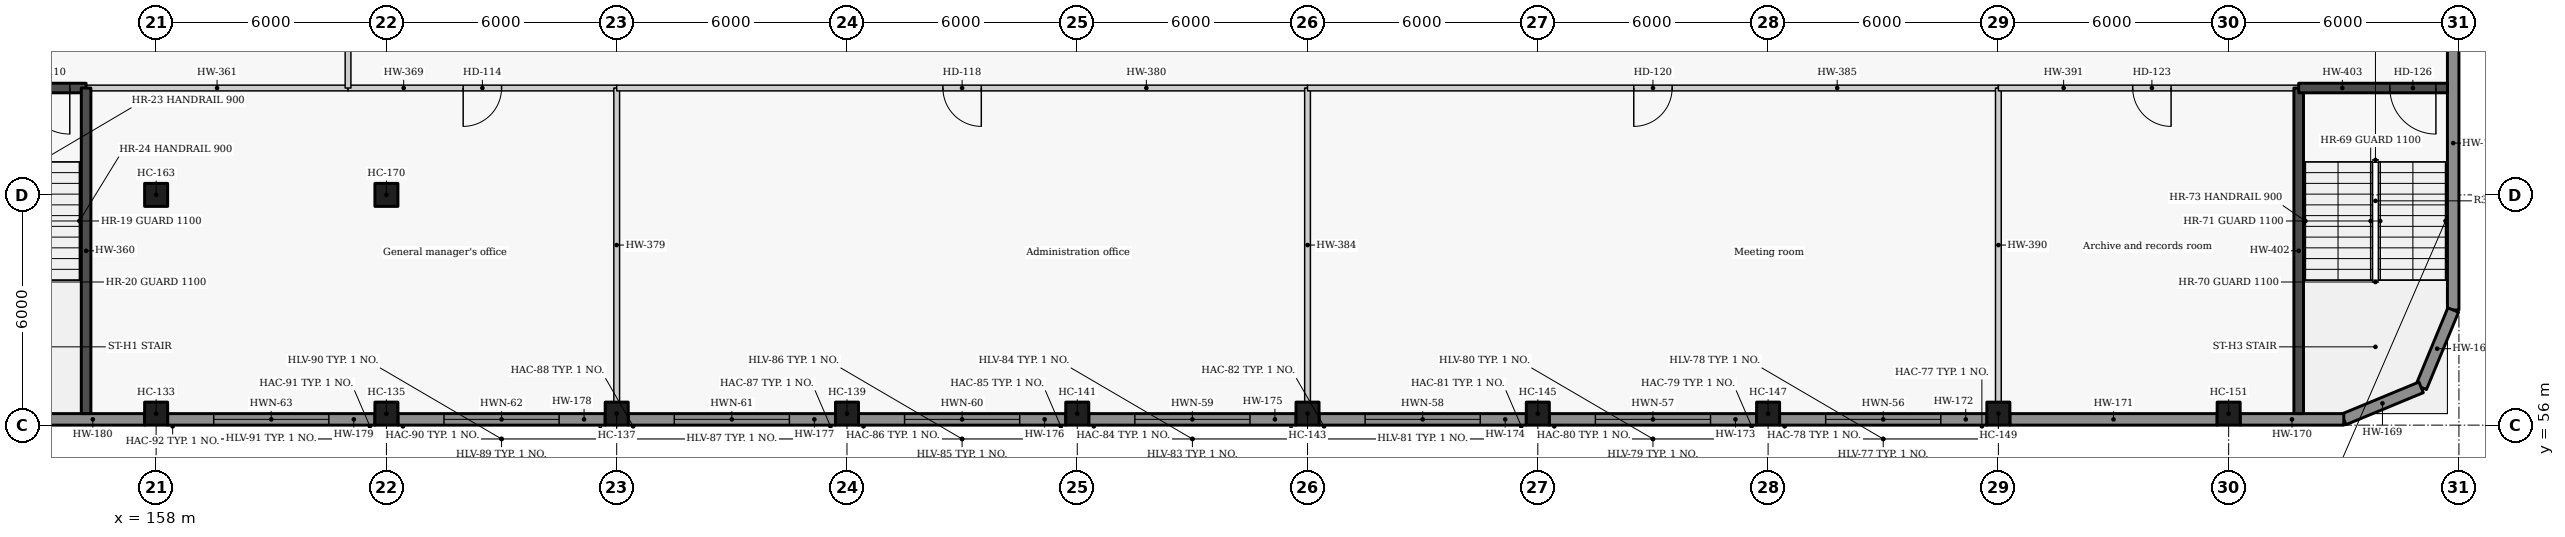
"""IFC4 building model, lengths in metres.
Left out: names, types, materials, properties, quantities, classifications, styles, units other than length and angle.
Written with IfcOpenShell. Run it as: python <this file> out.ifc"""

import sys

from ifc_helpers import new_model, si_unit, direction, frame, frame_2d, origin, origin_2d, place, context, subcontext, project, spatial, rectangle, extrude, element, fill, save


model = new_model("IFC4")
c1 = context("Model", 3, precision=1e-05, world=origin(), true_north=direction((0.0, 1.0)))
c2 = subcontext(c1, "Body", "Model", "MODEL_VIEW")
j1 = project(units=[si_unit("LENGTHUNIT", "METRE"), si_unit("PLANEANGLEUNIT", "RADIAN")], contexts=[c1])
p1 = place(None, origin())
s1 = spatial("IfcSite", under=j1, at=p1, CompositionType="ELEMENT")
p2 = place(p1, origin())
s2 = spatial("IfcBuilding", under=s1, at=p2, CompositionType="ELEMENT")
p3 = place(p2, frame((0.0, 0.0, 15.6)))
s3 = spatial("IfcBuildingStorey", under=s2, at=p3, CompositionType="ELEMENT", Elevation=15.6)
for number, where, z_axis, x_axis in (
    (1, (158.0, 56.3, 0.0), (0.0, 0.0, 1.0), (1.0, 0.0, 0.0)),
    (2, (164.0, 56.3, 0.0), (0.0, 0.0, 1.0), (1.0, 0.0, 0.0)),
    (3, (170.0, 56.3, 0.0), (0.0, 0.0, 1.0), (1.0, 0.0, 0.0)),
    (4, (176.0, 56.3, 0.0), (0.0, 0.0, 1.0), (1.0, 0.0, 0.0)),
    (5, (182.0, 56.3, 0.0), (0.0, 0.0, 1.0), (1.0, 0.0, 0.0)),
    (6, (188.0, 56.3, 0.0), (0.0, 0.0, 1.0), (1.0, 0.0, 0.0)),
    (7, (194.0, 56.3, 0.0), (0.0, 0.0, 1.0), (1.0, 0.0, 0.0)),
    (8, (200.0, 56.3, 0.0), (0.0, 0.0, 1.0), (1.0, 0.0, 0.0)),
    (9, (206.0, 56.3, 0.0), (0.0, 0.0, 1.0), (1.0, 0.0, 0.0)),
    (10, (212.0, 56.3, 0.0), (0.0, 0.0, 1.0), (1.0, 0.0, 0.0)),
    (11, (158.0, 62.0, 0.0), (0.0, 0.0, 1.0), (1.0, 0.0, 0.0)),
    (12, (164.0, 62.0, 0.0), (0.0, 0.0, 1.0), (1.0, 0.0, 0.0)),
):
    element("IfcColumn", number, at=place(p3, frame(where, z_axis=z_axis, x_axis=x_axis)), inside=s3, PredefinedType="COLUMN", context=c2, shape_type="SweptSolid", body=[
        extrude(rectangle(XDim=0.6, YDim=0.6, at=origin_2d()), origin(), (0.0, 0.0, 1.0), 4.2),
    ])
p4 = place(p3, frame((217.85, 67.7, 0.0), z_axis=(0.0, 0.0, 1.0), x_axis=(0.0, -1.0, 0.0)))
e13 = element("IfcWall", 13, at=p4, inside=s3, PredefinedType="SOLIDWALL", context=c2, shape_type="SweptSolid", body=[
    extrude(rectangle(XDim=8.7, YDim=0.3, at=frame_2d((4.35, 0.0))), origin(), (0.0, 0.0, 1.0), 4.2),
])
for number, where, z_axis, x_axis in (
    (14, (217.85, 59.0, 0.0), (0.0, 0.0, 1.0), (-0.383, -0.924, 0.0)),
    (15, (217.015, 56.985, 0.0), (0.0, 0.0, 1.0), (-0.924, -0.383, 0.0)),
):
    element("IfcWall", number, at=place(p3, frame(where, z_axis=z_axis, x_axis=x_axis)), inside=s3, PredefinedType="SOLIDWALL", context=c2, shape_type="SweptSolid", body=[
        extrude(rectangle(XDim=2.181, YDim=0.3, at=frame_2d((1.091, 0.0))), origin(), (0.0, 0.0, 1.0), 4.2),
    ])
p5 = place(p3, frame((215.0, 56.15, 0.0), z_axis=(0.0, 0.0, 1.0), x_axis=(-1.0, 0.0, 0.0)))
e16 = element("IfcWall", 16, at=p5, inside=s3, PredefinedType="SOLIDWALL", context=c2, shape_type="SweptSolid", body=[
    extrude(rectangle(XDim=2.7, YDim=0.3, at=frame_2d((1.35, 0.0))), origin(), (0.0, 0.0, 1.0), 4.2),
])
p6 = place(p3, frame((211.7, 56.15, 0.0), z_axis=(0.0, 0.0, 1.0), x_axis=(-1.0, 0.0, 0.0)))
e17 = element("IfcWall", 17, at=p6, inside=s3, PredefinedType="SOLIDWALL", context=c2, shape_type="SweptSolid", body=[
    extrude(rectangle(XDim=5.4, YDim=0.3, at=frame_2d((2.7, 0.0))), origin(), (0.0, 0.0, 1.0), 4.2),
])
p7 = place(p3, frame((205.7, 56.15, 0.0), z_axis=(0.0, 0.0, 1.0), x_axis=(-1.0, 0.0, 0.0)))
e18 = element("IfcWall", 18, at=p7, inside=s3, PredefinedType="SOLIDWALL", context=c2, shape_type="SweptSolid", body=[
    extrude(rectangle(XDim=5.4, YDim=0.3, at=frame_2d((2.7, 0.0))), origin(), (0.0, 0.0, 1.0), 4.2),
])
p8 = place(p7, frame((1.2, 0.0, 0.9)))
e19 = element("IfcOpeningElement", 19, at=p8, cuts=e18, PredefinedType="OPENING", context=c2, shape_type="SweptSolid", body=[
    extrude(rectangle(XDim=3.0, YDim=1.8, at=frame_2d((1.5, 0.9))), frame((0.0, 0.16, 0.0), z_axis=(0.0, -1.0, 0.0), x_axis=(1.0, 0.0, 0.0)), (0.0, 0.0, 1.0), 0.32),
])
p9 = place(p3, frame((199.7, 56.15, 0.0), z_axis=(0.0, 0.0, 1.0), x_axis=(-1.0, 0.0, 0.0)))
e20 = element("IfcWall", 20, at=p9, inside=s3, PredefinedType="SOLIDWALL", context=c2, shape_type="SweptSolid", body=[
    extrude(rectangle(XDim=5.4, YDim=0.3, at=frame_2d((2.7, 0.0))), origin(), (0.0, 0.0, 1.0), 4.2),
])
p10 = place(p9, frame((1.2, 0.0, 0.9)))
e21 = element("IfcOpeningElement", 21, at=p10, cuts=e20, PredefinedType="OPENING", context=c2, shape_type="SweptSolid", body=[
    extrude(rectangle(XDim=3.0, YDim=1.8, at=frame_2d((1.5, 0.9))), frame((0.0, 0.16, 0.0), z_axis=(0.0, -1.0, 0.0), x_axis=(1.0, 0.0, 0.0)), (0.0, 0.0, 1.0), 0.32),
])
p11 = place(p3, frame((193.7, 56.15, 0.0), z_axis=(0.0, 0.0, 1.0), x_axis=(-1.0, 0.0, 0.0)))
e22 = element("IfcWall", 22, at=p11, inside=s3, PredefinedType="SOLIDWALL", context=c2, shape_type="SweptSolid", body=[
    extrude(rectangle(XDim=5.4, YDim=0.3, at=frame_2d((2.7, 0.0))), origin(), (0.0, 0.0, 1.0), 4.2),
])
p12 = place(p11, frame((1.2, 0.0, 0.9)))
e23 = element("IfcOpeningElement", 23, at=p12, cuts=e22, PredefinedType="OPENING", context=c2, shape_type="SweptSolid", body=[
    extrude(rectangle(XDim=3.0, YDim=1.8, at=frame_2d((1.5, 0.9))), frame((0.0, 0.16, 0.0), z_axis=(0.0, -1.0, 0.0), x_axis=(1.0, 0.0, 0.0)), (0.0, 0.0, 1.0), 0.32),
])
p13 = place(p3, frame((187.7, 56.15, 0.0), z_axis=(0.0, 0.0, 1.0), x_axis=(-1.0, 0.0, 0.0)))
e24 = element("IfcWall", 24, at=p13, inside=s3, PredefinedType="SOLIDWALL", context=c2, shape_type="SweptSolid", body=[
    extrude(rectangle(XDim=5.4, YDim=0.3, at=frame_2d((2.7, 0.0))), origin(), (0.0, 0.0, 1.0), 4.2),
])
p14 = place(p13, frame((1.2, 0.0, 0.9)))
e25 = element("IfcOpeningElement", 25, at=p14, cuts=e24, PredefinedType="OPENING", context=c2, shape_type="SweptSolid", body=[
    extrude(rectangle(XDim=3.0, YDim=1.8, at=frame_2d((1.5, 0.9))), frame((0.0, 0.16, 0.0), z_axis=(0.0, -1.0, 0.0), x_axis=(1.0, 0.0, 0.0)), (0.0, 0.0, 1.0), 0.32),
])
p15 = place(p3, frame((181.7, 56.15, 0.0), z_axis=(0.0, 0.0, 1.0), x_axis=(-1.0, 0.0, 0.0)))
e26 = element("IfcWall", 26, at=p15, inside=s3, PredefinedType="SOLIDWALL", context=c2, shape_type="SweptSolid", body=[
    extrude(rectangle(XDim=5.4, YDim=0.3, at=frame_2d((2.7, 0.0))), origin(), (0.0, 0.0, 1.0), 4.2),
])
p16 = place(p15, frame((1.2, 0.0, 0.9)))
e27 = element("IfcOpeningElement", 27, at=p16, cuts=e26, PredefinedType="OPENING", context=c2, shape_type="SweptSolid", body=[
    extrude(rectangle(XDim=3.0, YDim=1.8, at=frame_2d((1.5, 0.9))), frame((0.0, 0.16, 0.0), z_axis=(0.0, -1.0, 0.0), x_axis=(1.0, 0.0, 0.0)), (0.0, 0.0, 1.0), 0.32),
])
p17 = place(p3, frame((175.7, 56.15, 0.0), z_axis=(0.0, 0.0, 1.0), x_axis=(-1.0, 0.0, 0.0)))
e28 = element("IfcWall", 28, at=p17, inside=s3, PredefinedType="SOLIDWALL", context=c2, shape_type="SweptSolid", body=[
    extrude(rectangle(XDim=5.4, YDim=0.3, at=frame_2d((2.7, 0.0))), origin(), (0.0, 0.0, 1.0), 4.2),
])
p18 = place(p17, frame((1.2, 0.0, 0.9)))
e29 = element("IfcOpeningElement", 29, at=p18, cuts=e28, PredefinedType="OPENING", context=c2, shape_type="SweptSolid", body=[
    extrude(rectangle(XDim=3.0, YDim=1.8, at=frame_2d((1.5, 0.9))), frame((0.0, 0.16, 0.0), z_axis=(0.0, -1.0, 0.0), x_axis=(1.0, 0.0, 0.0)), (0.0, 0.0, 1.0), 0.32),
])
p19 = place(p3, frame((169.7, 56.15, 0.0), z_axis=(0.0, 0.0, 1.0), x_axis=(-1.0, 0.0, 0.0)))
e30 = element("IfcWall", 30, at=p19, inside=s3, PredefinedType="SOLIDWALL", context=c2, shape_type="SweptSolid", body=[
    extrude(rectangle(XDim=5.4, YDim=0.3, at=frame_2d((2.7, 0.0))), origin(), (0.0, 0.0, 1.0), 4.2),
])
p20 = place(p19, frame((1.2, 0.0, 0.9)))
e31 = element("IfcOpeningElement", 31, at=p20, cuts=e30, PredefinedType="OPENING", context=c2, shape_type="SweptSolid", body=[
    extrude(rectangle(XDim=3.0, YDim=1.8, at=frame_2d((1.5, 0.9))), frame((0.0, 0.16, 0.0), z_axis=(0.0, -1.0, 0.0), x_axis=(1.0, 0.0, 0.0)), (0.0, 0.0, 1.0), 0.32),
])
p21 = place(p3, frame((163.7, 56.15, 0.0), z_axis=(0.0, 0.0, 1.0), x_axis=(-1.0, 0.0, 0.0)))
e32 = element("IfcWall", 32, at=p21, inside=s3, PredefinedType="SOLIDWALL", context=c2, shape_type="SweptSolid", body=[
    extrude(rectangle(XDim=5.4, YDim=0.3, at=frame_2d((2.7, 0.0))), origin(), (0.0, 0.0, 1.0), 4.2),
])
p22 = place(p21, frame((1.2, 0.0, 0.9)))
e33 = element("IfcOpeningElement", 33, at=p22, cuts=e32, PredefinedType="OPENING", context=c2, shape_type="SweptSolid", body=[
    extrude(rectangle(XDim=3.0, YDim=1.8, at=frame_2d((1.5, 0.9))), frame((0.0, 0.16, 0.0), z_axis=(0.0, -1.0, 0.0), x_axis=(1.0, 0.0, 0.0)), (0.0, 0.0, 1.0), 0.32),
])
p23 = place(p3, frame((157.7, 56.15, 0.0), z_axis=(0.0, 0.0, 1.0), x_axis=(-1.0, 0.0, 0.0)))
e34 = element("IfcWall", 34, at=p23, inside=s3, PredefinedType="SOLIDWALL", context=c2, shape_type="SweptSolid", body=[
    extrude(rectangle(XDim=2.7, YDim=0.3, at=frame_2d((1.35, 0.0))), origin(), (0.0, 0.0, 1.0), 4.2),
])
p24 = place(p3, frame((156.175, 64.785, 0.0), z_axis=(0.0, 0.0, 1.0), x_axis=(-1.0, 0.0, 0.0)))
e35 = element("IfcWall", 35, at=p24, inside=s3, PredefinedType="SOLIDWALL", context=c2, shape_type="SweptSolid", body=[
    extrude(rectangle(XDim=3.875, YDim=0.25, at=frame_2d((1.938, 0.0))), origin(), (0.0, 0.0, 1.0), 4.2),
])
p25 = place(p24, frame((0.425, 0.0, 0.0)))
e36 = element("IfcOpeningElement", 36, at=p25, cuts=e35, PredefinedType="OPENING", context=c2, shape_type="SweptSolid", body=[
    extrude(rectangle(XDim=1.2, YDim=2.1, at=frame_2d((0.6, 1.05))), frame((0.0, 0.135, 0.0), z_axis=(0.0, -1.0, 0.0), x_axis=(1.0, 0.0, 0.0)), (0.0, 0.0, 1.0), 0.27),
])
p26 = place(p3, frame((156.175, 64.785, 0.0), z_axis=(0.0, 0.0, 1.0), x_axis=(0.0, -1.0, 0.0)))
e37 = element("IfcWall", 37, at=p26, inside=s3, PredefinedType="SOLIDWALL", context=c2, shape_type="SweptSolid", body=[
    extrude(rectangle(XDim=8.485, YDim=0.25, at=frame_2d((4.242, 0.0))), origin(), (0.0, 0.0, 1.0), 4.2),
])
p27 = place(p3, frame((163.0, 64.785, 0.0), z_axis=(0.0, 0.0, 1.0), x_axis=(-1.0, 0.0, 0.0)))
e38 = element("IfcWall", 38, at=p27, inside=s3, PredefinedType="PARTITIONING", context=c2, shape_type="SweptSolid", body=[
    extrude(rectangle(XDim=6.825, YDim=0.15, at=frame_2d((3.413, 0.0))), origin(), (0.0, 0.0, 1.0), 3.85),
])
p28 = place(p3, frame((170.0, 64.785, 0.0), z_axis=(0.0, 0.0, 1.0), x_axis=(-1.0, 0.0, 0.0)))
e39 = element("IfcWall", 39, at=p28, inside=s3, PredefinedType="PARTITIONING", context=c2, shape_type="SweptSolid", body=[
    extrude(rectangle(XDim=7.0, YDim=0.15, at=frame_2d((3.5, 0.0))), origin(), (0.0, 0.0, 1.0), 3.85),
])
p29 = place(p28, frame((3.0, 0.0, 0.0)))
e40 = element("IfcOpeningElement", 40, at=p29, cuts=e39, PredefinedType="OPENING", context=c2, shape_type="SweptSolid", body=[
    extrude(rectangle(XDim=1.0, YDim=2.1, at=frame_2d((0.5, 1.05))), frame((0.0, 0.085, 0.0), z_axis=(0.0, -1.0, 0.0), x_axis=(1.0, 0.0, 0.0)), (0.0, 0.0, 1.0), 0.17),
])
p30 = place(p3, frame((163.0, 64.785, 0.0), z_axis=(0.0, 0.0, 1.0), x_axis=(0.0, 1.0, 0.0)))
e41 = element("IfcWall", 41, at=p30, inside=s3, PredefinedType="PARTITIONING", context=c2, shape_type="SweptSolid", body=[
    extrude(rectangle(XDim=30.43, YDim=0.15, at=frame_2d((15.215, 0.0))), origin(), (0.0, 0.0, 1.0), 3.85),
])
p31 = place(p30, frame((15.68, 0.0, 0.0)))
e42 = element("IfcOpeningElement", 42, at=p31, cuts=e41, PredefinedType="OPENING", context=c2, shape_type="SweptSolid", body=[
    extrude(rectangle(XDim=1.0, YDim=2.1, at=frame_2d((0.5, 1.05))), frame((0.0, 0.085, 0.0), z_axis=(0.0, -1.0, 0.0), x_axis=(1.0, 0.0, 0.0)), (0.0, 0.0, 1.0), 0.17),
])
p32 = place(p3, frame((170.0, 64.785, 0.0), z_axis=(0.0, 0.0, 1.0), x_axis=(0.0, -1.0, 0.0)))
e43 = element("IfcWall", 43, at=p32, inside=s3, PredefinedType="PARTITIONING", context=c2, shape_type="SweptSolid", body=[
    extrude(rectangle(XDim=8.185, YDim=0.15, at=frame_2d((4.092, 0.0))), origin(), (0.0, 0.0, 1.0), 3.85),
])
p33 = place(p3, frame((188.0, 64.785, 0.0), z_axis=(0.0, 0.0, 1.0), x_axis=(-1.0, 0.0, 0.0)))
e44 = element("IfcWall", 44, at=p33, inside=s3, PredefinedType="PARTITIONING", context=c2, shape_type="SweptSolid", body=[
    extrude(rectangle(XDim=18.0, YDim=0.15, at=frame_2d((9.0, 0.0))), origin(), (0.0, 0.0, 1.0), 3.85),
])
p34 = place(p33, frame((8.5, 0.0, 0.0)))
e45 = element("IfcOpeningElement", 45, at=p34, cuts=e44, PredefinedType="OPENING", context=c2, shape_type="SweptSolid", body=[
    extrude(rectangle(XDim=1.0, YDim=2.1, at=frame_2d((0.5, 1.05))), frame((0.0, 0.085, 0.0), z_axis=(0.0, -1.0, 0.0), x_axis=(1.0, 0.0, 0.0)), (0.0, 0.0, 1.0), 0.17),
])
p35 = place(p3, frame((188.0, 64.785, 0.0), z_axis=(0.0, 0.0, 1.0), x_axis=(0.0, -1.0, 0.0)))
e46 = element("IfcWall", 46, at=p35, inside=s3, PredefinedType="PARTITIONING", context=c2, shape_type="SweptSolid", body=[
    extrude(rectangle(XDim=8.185, YDim=0.15, at=frame_2d((4.092, 0.0))), origin(), (0.0, 0.0, 1.0), 3.85),
])
p36 = place(p3, frame((206.0, 64.785, 0.0), z_axis=(0.0, 0.0, 1.0), x_axis=(-1.0, 0.0, 0.0)))
e47 = element("IfcWall", 47, at=p36, inside=s3, PredefinedType="PARTITIONING", context=c2, shape_type="SweptSolid", body=[
    extrude(rectangle(XDim=18.0, YDim=0.15, at=frame_2d((9.0, 0.0))), origin(), (0.0, 0.0, 1.0), 3.85),
])
p37 = place(p36, frame((8.5, 0.0, 0.0)))
e48 = element("IfcOpeningElement", 48, at=p37, cuts=e47, PredefinedType="OPENING", context=c2, shape_type="SweptSolid", body=[
    extrude(rectangle(XDim=1.0, YDim=2.1, at=frame_2d((0.5, 1.05))), frame((0.0, 0.085, 0.0), z_axis=(0.0, -1.0, 0.0), x_axis=(1.0, 0.0, 0.0)), (0.0, 0.0, 1.0), 0.17),
])
p38 = place(p3, frame((206.0, 64.785, 0.0), z_axis=(0.0, 0.0, 1.0), x_axis=(0.0, -1.0, 0.0)))
e49 = element("IfcWall", 49, at=p38, inside=s3, PredefinedType="PARTITIONING", context=c2, shape_type="SweptSolid", body=[
    extrude(rectangle(XDim=8.185, YDim=0.15, at=frame_2d((4.092, 0.0))), origin(), (0.0, 0.0, 1.0), 3.85),
])
p39 = place(p3, frame((213.825, 64.785, 0.0), z_axis=(0.0, 0.0, 1.0), x_axis=(-1.0, 0.0, 0.0)))
e50 = element("IfcWall", 50, at=p39, inside=s3, PredefinedType="PARTITIONING", context=c2, shape_type="SweptSolid", body=[
    extrude(rectangle(XDim=7.825, YDim=0.15, at=frame_2d((3.913, 0.0))), origin(), (0.0, 0.0, 1.0), 3.85),
])
p40 = place(p39, frame((3.325, 0.0, 0.0)))
e51 = element("IfcOpeningElement", 51, at=p40, cuts=e50, PredefinedType="OPENING", context=c2, shape_type="SweptSolid", body=[
    extrude(rectangle(XDim=1.0, YDim=2.1, at=frame_2d((0.5, 1.05))), frame((0.0, 0.085, 0.0), z_axis=(0.0, -1.0, 0.0), x_axis=(1.0, 0.0, 0.0)), (0.0, 0.0, 1.0), 0.17),
])
p41 = place(p3, frame((213.825, 56.3, 0.0), z_axis=(0.0, 0.0, 1.0), x_axis=(0.0, 1.0, 0.0)))
e52 = element("IfcWall", 52, at=p41, inside=s3, PredefinedType="SOLIDWALL", context=c2, shape_type="SweptSolid", body=[
    extrude(rectangle(XDim=8.485, YDim=0.25, at=frame_2d((4.242, 0.0))), origin(), (0.0, 0.0, 1.0), 4.2),
])
p42 = place(p3, frame((217.7, 64.785, 0.0), z_axis=(0.0, 0.0, 1.0), x_axis=(-1.0, 0.0, 0.0)))
e53 = element("IfcWall", 53, at=p42, inside=s3, PredefinedType="SOLIDWALL", context=c2, shape_type="SweptSolid", body=[
    extrude(rectangle(XDim=3.875, YDim=0.25, at=frame_2d((1.938, 0.0))), origin(), (0.0, 0.0, 1.0), 4.2),
])
p43 = place(p42, frame((0.3, 0.0, 0.0)))
e54 = element("IfcOpeningElement", 54, at=p43, cuts=e53, PredefinedType="OPENING", context=c2, shape_type="SweptSolid", body=[
    extrude(rectangle(XDim=1.2, YDim=2.1, at=frame_2d((0.6, 1.05))), frame((0.0, 0.135, 0.0), z_axis=(0.0, -1.0, 0.0), x_axis=(1.0, 0.0, 0.0)), (0.0, 0.0, 1.0), 0.27),
])
p44 = place(p8, origin())
e55 = element("IfcWindow", 55, at=p44, inside=s3, PartitioningType="SINGLE_PANEL", PredefinedType="WINDOW", context=c2, shape_type="SweptSolid", body=[
    extrude(rectangle(XDim=3.0, YDim=1.8, at=frame_2d((1.5, 0.9))), frame((0.0, 0.03, 0.0), z_axis=(0.0, -1.0, 0.0), x_axis=(1.0, 0.0, 0.0)), (0.0, 0.0, 1.0), 0.06),
])
fill(e19, e55)
p45 = place(p10, origin())
e56 = element("IfcWindow", 56, at=p45, inside=s3, PartitioningType="SINGLE_PANEL", PredefinedType="WINDOW", context=c2, shape_type="SweptSolid", body=[
    extrude(rectangle(XDim=3.0, YDim=1.8, at=frame_2d((1.5, 0.9))), frame((0.0, 0.03, 0.0), z_axis=(0.0, -1.0, 0.0), x_axis=(1.0, 0.0, 0.0)), (0.0, 0.0, 1.0), 0.06),
])
fill(e21, e56)
p46 = place(p12, origin())
e57 = element("IfcWindow", 57, at=p46, inside=s3, PartitioningType="SINGLE_PANEL", PredefinedType="WINDOW", context=c2, shape_type="SweptSolid", body=[
    extrude(rectangle(XDim=3.0, YDim=1.8, at=frame_2d((1.5, 0.9))), frame((0.0, 0.03, 0.0), z_axis=(0.0, -1.0, 0.0), x_axis=(1.0, 0.0, 0.0)), (0.0, 0.0, 1.0), 0.06),
])
fill(e23, e57)
p47 = place(p14, origin())
e58 = element("IfcWindow", 58, at=p47, inside=s3, PartitioningType="SINGLE_PANEL", PredefinedType="WINDOW", context=c2, shape_type="SweptSolid", body=[
    extrude(rectangle(XDim=3.0, YDim=1.8, at=frame_2d((1.5, 0.9))), frame((0.0, 0.03, 0.0), z_axis=(0.0, -1.0, 0.0), x_axis=(1.0, 0.0, 0.0)), (0.0, 0.0, 1.0), 0.06),
])
fill(e25, e58)
p48 = place(p16, origin())
e59 = element("IfcWindow", 59, at=p48, inside=s3, PartitioningType="SINGLE_PANEL", PredefinedType="WINDOW", context=c2, shape_type="SweptSolid", body=[
    extrude(rectangle(XDim=3.0, YDim=1.8, at=frame_2d((1.5, 0.9))), frame((0.0, 0.03, 0.0), z_axis=(0.0, -1.0, 0.0), x_axis=(1.0, 0.0, 0.0)), (0.0, 0.0, 1.0), 0.06),
])
fill(e27, e59)
p49 = place(p18, origin())
e60 = element("IfcWindow", 60, at=p49, inside=s3, PartitioningType="SINGLE_PANEL", PredefinedType="WINDOW", context=c2, shape_type="SweptSolid", body=[
    extrude(rectangle(XDim=3.0, YDim=1.8, at=frame_2d((1.5, 0.9))), frame((0.0, 0.03, 0.0), z_axis=(0.0, -1.0, 0.0), x_axis=(1.0, 0.0, 0.0)), (0.0, 0.0, 1.0), 0.06),
])
fill(e29, e60)
p50 = place(p20, origin())
e61 = element("IfcWindow", 61, at=p50, inside=s3, PartitioningType="SINGLE_PANEL", PredefinedType="WINDOW", context=c2, shape_type="SweptSolid", body=[
    extrude(rectangle(XDim=3.0, YDim=1.8, at=frame_2d((1.5, 0.9))), frame((0.0, 0.03, 0.0), z_axis=(0.0, -1.0, 0.0), x_axis=(1.0, 0.0, 0.0)), (0.0, 0.0, 1.0), 0.06),
])
fill(e31, e61)
p51 = place(p22, origin())
e62 = element("IfcWindow", 62, at=p51, inside=s3, PartitioningType="SINGLE_PANEL", PredefinedType="WINDOW", context=c2, shape_type="SweptSolid", body=[
    extrude(rectangle(XDim=3.0, YDim=1.8, at=frame_2d((1.5, 0.9))), frame((0.0, 0.03, 0.0), z_axis=(0.0, -1.0, 0.0), x_axis=(1.0, 0.0, 0.0)), (0.0, 0.0, 1.0), 0.06),
])
fill(e33, e62)
p52 = place(p25, origin())
e63 = element("IfcDoor", 63, at=p52, inside=s3, OperationType="SINGLE_SWING_LEFT", PredefinedType="DOOR", context=c2, shape_type="SweptSolid", body=[
    extrude(rectangle(XDim=1.2, YDim=2.1, at=frame_2d((0.6, 1.05))), frame((0.0, 0.025, 0.0), z_axis=(0.0, -1.0, 0.0), x_axis=(1.0, 0.0, 0.0)), (0.0, 0.0, 1.0), 0.05),
])
fill(e36, e63)
p53 = place(p29, origin())
e64 = element("IfcDoor", 64, at=p53, inside=s3, OperationType="SINGLE_SWING_RIGHT", PredefinedType="DOOR", context=c2, shape_type="SweptSolid", body=[
    extrude(rectangle(XDim=1.0, YDim=2.1, at=frame_2d((0.5, 1.05))), frame((0.0, 0.025, 0.0), z_axis=(0.0, -1.0, 0.0), x_axis=(1.0, 0.0, 0.0)), (0.0, 0.0, 1.0), 0.05),
])
fill(e40, e64)
p54 = place(p34, origin())
e65 = element("IfcDoor", 65, at=p54, inside=s3, OperationType="SINGLE_SWING_LEFT", PredefinedType="DOOR", context=c2, shape_type="SweptSolid", body=[
    extrude(rectangle(XDim=1.0, YDim=2.1, at=frame_2d((0.5, 1.05))), frame((0.0, 0.025, 0.0), z_axis=(0.0, -1.0, 0.0), x_axis=(1.0, 0.0, 0.0)), (0.0, 0.0, 1.0), 0.05),
])
fill(e45, e65)
p55 = place(p37, origin())
e66 = element("IfcDoor", 66, at=p55, inside=s3, OperationType="SINGLE_SWING_RIGHT", PredefinedType="DOOR", context=c2, shape_type="SweptSolid", body=[
    extrude(rectangle(XDim=1.0, YDim=2.1, at=frame_2d((0.5, 1.05))), frame((0.0, 0.025, 0.0), z_axis=(0.0, -1.0, 0.0), x_axis=(1.0, 0.0, 0.0)), (0.0, 0.0, 1.0), 0.05),
])
fill(e48, e66)
p56 = place(p40, origin())
e67 = element("IfcDoor", 67, at=p56, inside=s3, OperationType="SINGLE_SWING_LEFT", PredefinedType="DOOR", context=c2, shape_type="SweptSolid", body=[
    extrude(rectangle(XDim=1.0, YDim=2.1, at=frame_2d((0.5, 1.05))), frame((0.0, 0.025, 0.0), z_axis=(0.0, -1.0, 0.0), x_axis=(1.0, 0.0, 0.0)), (0.0, 0.0, 1.0), 0.05),
])
fill(e51, e67)
p57 = place(p43, origin())
e68 = element("IfcDoor", 68, at=p57, inside=s3, OperationType="SINGLE_SWING_LEFT", PredefinedType="DOOR", context=c2, shape_type="SweptSolid", body=[
    extrude(rectangle(XDim=1.2, YDim=2.1, at=frame_2d((0.6, 1.05))), frame((0.0, 0.025, 0.0), z_axis=(0.0, -1.0, 0.0), x_axis=(1.0, 0.0, 0.0)), (0.0, 0.0, 1.0), 0.05),
])
fill(e54, e68)
save(model, sys.argv[1])
